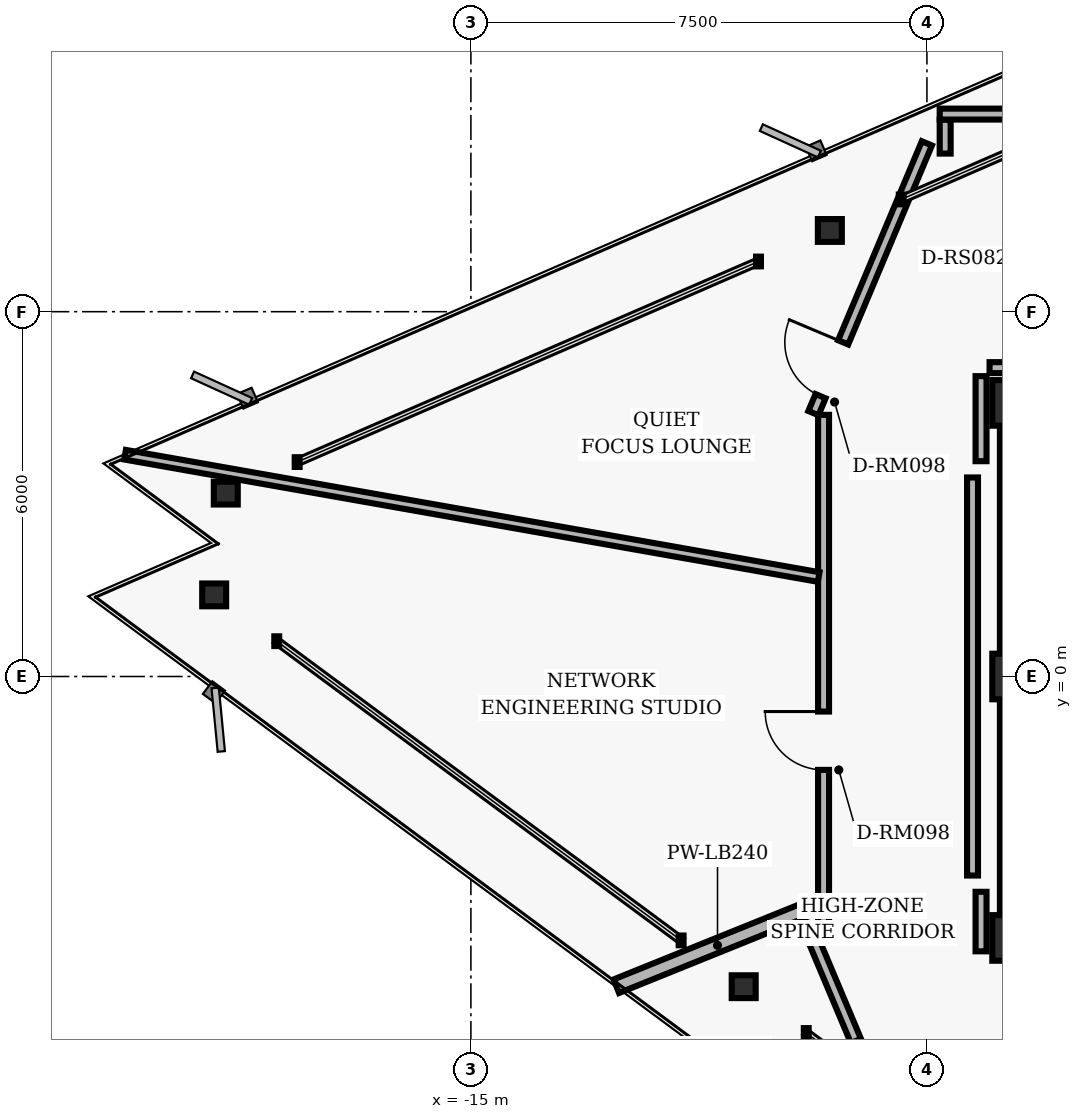
"""IFC4 building model, lengths in metres.
Left out: names, types, materials, properties, quantities, classifications, styles, units other than length and angle.
Written with IfcOpenShell. Run it as: python <this file> out.ifc"""

import sys

from ifc_helpers import new_model, si_unit, direction, frame, frame_2d, origin, origin_2d, place, context, subcontext, project, spatial, rectangle, hollow_rectangle, i_section, extrude, element, fill, save


model = new_model("IFC4")
c1 = context("Model", 3, precision=1e-05, world=origin(), true_north=direction((0.0, 1.0)))
c2 = subcontext(c1, "Body", "Model", "MODEL_VIEW")
j1 = project(units=[si_unit("LENGTHUNIT", "METRE"), si_unit("PLANEANGLEUNIT", "RADIAN")], contexts=[c1])
p1 = place(None, origin())
s1 = spatial("IfcSite", under=j1, at=p1, CompositionType="ELEMENT")
p2 = place(p1, origin())
s2 = spatial("IfcBuilding", under=s1, at=p2, CompositionType="ELEMENT")
p3 = place(p2, frame((0.0, 0.0, 217.92)))
s3 = spatial("IfcBuildingStorey", under=s2, at=p3, CompositionType="ELEMENT", Elevation=217.92)
for number, where, z_axis, x_axis in (
    (1, (-6.05, 4.5, 0.0), (0.0, 0.0, 1.0), (1.0, 0.0, 0.0)),
    (2, (-6.05, 0.0, 0.0), (0.0, 0.0, 1.0), (1.0, 0.0, 0.0)),
    (3, (-6.05, -4.3, 0.0), (0.0, 0.0, 1.0), (1.0, 0.0, 0.0)),
):
    element("IfcColumn", number, at=place(p3, frame(where, z_axis=z_axis, x_axis=x_axis)), inside=s3, PredefinedType="COLUMN", context=c2, shape_type="SweptSolid", body=[
        extrude(hollow_rectangle(XDim=0.75, YDim=0.75, WallThickness=0.05, InnerFilletRadius=0.02, OuterFilletRadius=0.04, at=origin_2d()), origin(), (0.0, 0.0, 1.0), 3.04),
    ])
p4 = place(p3, frame((-6.05, 0.375, 0.0), z_axis=(0.0, 0.0, 1.0), x_axis=(0.0, 1.0, 0.0)))
e4 = element("IfcWall", 4, at=p4, inside=s3, PredefinedType="SHEAR", context=c2, shape_type="SweptSolid", body=[
    extrude(rectangle(XDim=3.75, YDim=0.5, at=frame_2d((1.875, 0.0))), origin(), (0.0, 0.0, 1.0), 2.798),
])
p5 = place(p3, frame((-6.05, -3.925, 0.0), z_axis=(0.0, 0.0, 1.0), x_axis=(0.0, 1.0, 0.0)))
e5 = element("IfcWall", 5, at=p5, inside=s3, PredefinedType="SHEAR", context=c2, shape_type="SweptSolid", body=[
    extrude(rectangle(XDim=3.55, YDim=0.5, at=frame_2d((1.775, 0.0))), origin(), (0.0, 0.0, 1.0), 2.798),
])
for number, where, z_axis, x_axis in (
    (6, (-9.096, 7.336, 0.0), (0.0, 0.0, 1.0), (1.0, 0.0, 0.0)),
    (7, (-19.031, 3.016, 0.0), (0.0, 0.0, 1.0), (1.0, 0.0, 0.0)),
    (8, (-19.222, 1.342, 0.0), (0.0, 0.0, 1.0), (1.0, 0.0, 0.0)),
    (9, (-10.513, -5.102, 0.0), (0.0, 0.0, 1.0), (1.0, 0.0, 0.0)),
):
    element("IfcColumn", number, at=place(p3, frame(where, z_axis=z_axis, x_axis=x_axis)), inside=s3, PredefinedType="COLUMN", context=c2, shape_type="SweptSolid", body=[
        extrude(i_section(OverallWidth=0.394, OverallDepth=0.375, WebThickness=0.017, FlangeThickness=0.028, FilletRadius=0.016, at=origin_2d()), origin(), (0.0, 0.0, 1.0), 3.04),
    ])
p6 = place(p3, frame((-7.574, -8.596, 0.0), z_axis=(0.0, 0.0, 1.0), x_axis=(-0.38757793583, 0.921836939842, 0.0)))
e10 = element("IfcWall", 10, at=p6, inside=s3, PredefinedType="PARTITIONING", context=c2, shape_type="SweptSolid", body=[
    extrude(rectangle(XDim=4.625, YDim=0.18, at=frame_2d((2.313, 0.0))), origin(), (0.0, 0.0, 1.0), 2.773),
])
p7 = place(p6, frame((1.803, 0.0, 0.0)))
e11 = element("IfcOpeningElement", 11, at=p7, cuts=e10, PredefinedType="OPENING", context=c2, shape_type="SweptSolid", body=[
    extrude(rectangle(XDim=1.02, YDim=2.02, at=frame_2d((0.51, 1.01))), frame((0.0, 0.1, 0.0), z_axis=(0.0, -1.0, 0.0), x_axis=(1.0, 0.0, 0.0)), (0.0, 0.0, 1.0), 0.2),
])
p8 = place(p3, frame((-9.2, -4.303, 0.0), z_axis=(0.0, 0.0, 1.0), x_axis=(0.0, 1.0, 0.0)))
e12 = element("IfcWall", 12, at=p8, inside=s3, PredefinedType="PARTITIONING", context=c2, shape_type="SweptSolid", body=[
    extrude(rectangle(XDim=8.607, YDim=0.18, at=frame_2d((4.303, 0.0))), origin(), (0.0, 0.0, 1.0), 2.773),
])
p9 = place(p8, frame((2.767, 0.0, 0.0)))
e13 = element("IfcOpeningElement", 13, at=p9, cuts=e12, PredefinedType="OPENING", context=c2, shape_type="SweptSolid", body=[
    extrude(rectangle(XDim=0.96, YDim=2.02, at=frame_2d((0.48, 1.01))), frame((0.0, 0.1, 0.0), z_axis=(0.0, -1.0, 0.0), x_axis=(1.0, 0.0, 0.0)), (0.0, 0.0, 1.0), 0.2),
])
p10 = place(p3, frame((-9.367, 4.332, 0.0), z_axis=(0.0, 0.0, 1.0), x_axis=(0.387573945081, 0.921838617706, 0.0)))
e14 = element("IfcWall", 14, at=p10, inside=s3, PredefinedType="PARTITIONING", context=c2, shape_type="SweptSolid", body=[
    extrude(rectangle(XDim=4.813, YDim=0.18, at=frame_2d((2.407, 0.0))), origin(), (0.0, 0.0, 1.0), 2.773),
])
p11 = place(p10, frame((0.302, 0.0, 0.0)))
e15 = element("IfcOpeningElement", 15, at=p11, cuts=e14, PredefinedType="OPENING", context=c2, shape_type="SweptSolid", body=[
    extrude(rectangle(XDim=0.96, YDim=2.02, at=frame_2d((0.48, 1.01))), frame((0.0, 0.1, 0.0), z_axis=(0.0, -1.0, 0.0), x_axis=(1.0, 0.0, 0.0)), (0.0, 0.0, 1.0), 0.2),
])
p12 = place(p3, frame((-7.2, 8.601, 0.0), z_axis=(0.0, 0.0, 1.0), x_axis=(0.0, 1.0, 0.0)))
e16 = element("IfcWall", 16, at=p12, inside=s3, PredefinedType="PARTITIONING", context=c2, shape_type="SweptSolid", body=[
    extrude(rectangle(XDim=0.559, YDim=0.18, at=frame_2d((0.28, 0.0))), origin(), (0.0, 0.0, 1.0), 2.773),
])
p13 = place(p3, frame((-7.29, 9.25, 0.0), z_axis=(0.0, 0.0, 1.0), x_axis=(1.0, 0.0, 0.0)))
e17 = element("IfcWall", 17, at=p13, inside=s3, PredefinedType="PARTITIONING", context=c2, shape_type="SweptSolid", body=[
    extrude(rectangle(XDim=13.3, YDim=0.18, at=frame_2d((6.65, 0.0))), origin(), (0.0, 0.0, 1.0), 2.395),
])
p14 = place(p13, frame((10.819, 0.0, 0.0)))
e18 = element("IfcOpeningElement", 18, at=p14, cuts=e17, PredefinedType="OPENING", context=c2, shape_type="SweptSolid", body=[
    extrude(rectangle(XDim=1.02, YDim=2.02, at=frame_2d((0.51, 1.01))), frame((0.0, 0.1, 0.0), z_axis=(0.0, -1.0, 0.0), x_axis=(1.0, 0.0, 0.0)), (0.0, 0.0, 1.0), 0.2),
])
p15 = place(p13, frame((4.575, 0.0, 0.0)))
e19 = element("IfcOpeningElement", 19, at=p15, cuts=e17, PredefinedType="OPENING", context=c2, shape_type="SweptSolid", body=[
    extrude(rectangle(XDim=0.96, YDim=2.02, at=frame_2d((0.48, 1.01))), frame((0.0, 0.1, 0.0), z_axis=(0.0, -1.0, 0.0), x_axis=(1.0, 0.0, 0.0)), (0.0, 0.0, 1.0), 0.2),
])
p16 = place(p3, frame((-5.881, 5.08, 0.0), z_axis=(0.0, 0.0, 1.0), x_axis=(-1.0, 0.0, 0.0)))
e20 = element("IfcWall", 20, at=p16, inside=s3, PredefinedType="PARTITIONING", context=c2, shape_type="SweptSolid", body=[
    extrude(rectangle(XDim=0.589, YDim=0.18, at=frame_2d((0.294, 0.0))), origin(), (0.0, 0.0, 1.0), 2.773),
])
p17 = place(p3, frame((-6.61, 4.94, 0.0), z_axis=(0.0, 0.0, 1.0), x_axis=(0.0, -1.0, 0.0)))
e21 = element("IfcWall", 21, at=p17, inside=s3, PredefinedType="PARTITIONING", context=c2, shape_type="SweptSolid", body=[
    extrude(rectangle(XDim=1.399, YDim=0.18, at=frame_2d((0.699, 0.0))), origin(), (0.0, 0.0, 1.0), 2.773),
])
p18 = place(p3, frame((-6.75, 3.273, 0.0), z_axis=(0.0, 0.0, 1.0), x_axis=(0.0, -1.0, 0.0)))
e22 = element("IfcWall", 22, at=p18, inside=s3, PredefinedType="PARTITIONING", context=c2, shape_type="SweptSolid", body=[
    extrude(rectangle(XDim=6.547, YDim=0.18, at=frame_2d((3.273, 0.0))), origin(), (0.0, 0.0, 1.0), 2.773),
])
p19 = place(p3, frame((-6.61, -3.541, 0.0), z_axis=(0.0, 0.0, 1.0), x_axis=(0.0, -1.0, 0.0)))
e23 = element("IfcWall", 23, at=p19, inside=s3, PredefinedType="PARTITIONING", context=c2, shape_type="SweptSolid", body=[
    extrude(rectangle(XDim=0.979, YDim=0.18, at=frame_2d((0.489, 0.0))), origin(), (0.0, 0.0, 1.0), 2.773),
])
p20 = place(p3, frame((-9.28, -3.75, 0.0), z_axis=(0.0, 0.0, 1.0), x_axis=(-0.927209590074, -0.374542889499, 0.0)))
e24 = element("IfcWall", 24, at=p20, inside=s3, PredefinedType="PARTITIONING", context=c2, shape_type="SweptSolid", body=[
    extrude(rectangle(XDim=3.59, YDim=0.24, at=frame_2d((1.795, 0.0))), origin(), (0.0, 0.0, 1.0), 2.773),
])
p21 = place(p3, frame((-9.28, 1.636, 0.0), z_axis=(0.0, 0.0, 1.0), x_axis=(-0.984805616272, 0.173660295285, 0.0)))
e25 = element("IfcWall", 25, at=p21, inside=s3, PredefinedType="PARTITIONING", context=c2, shape_type="SweptSolid", body=[
    extrude(rectangle(XDim=11.584, YDim=0.16, at=frame_2d((5.792, 0.0))), origin(), (0.0, 0.0, 1.0), 2.253),
])
p22 = place(p9, origin())
e26 = element("IfcDoor", 26, at=p22, inside=s3, OperationType="SINGLE_SWING_RIGHT", PredefinedType="DOOR", context=c2, shape_type="SweptSolid", body=[
    extrude(rectangle(XDim=0.96, YDim=2.02, at=frame_2d((0.48, 1.01))), frame((0.0, 0.025, 0.0), z_axis=(0.0, -1.0, 0.0), x_axis=(1.0, 0.0, 0.0)), (0.0, 0.0, 1.0), 0.05),
])
fill(e13, e26)
p23 = place(p11, origin())
e27 = element("IfcDoor", 27, at=p23, inside=s3, OperationType="SINGLE_SWING_RIGHT", PredefinedType="DOOR", context=c2, shape_type="SweptSolid", body=[
    extrude(rectangle(XDim=0.96, YDim=2.02, at=frame_2d((0.48, 1.01))), frame((0.0, 0.025, 0.0), z_axis=(0.0, -1.0, 0.0), x_axis=(1.0, 0.0, 0.0)), (0.0, 0.0, 1.0), 0.05),
])
fill(e15, e27)
save(model, sys.argv[1])
